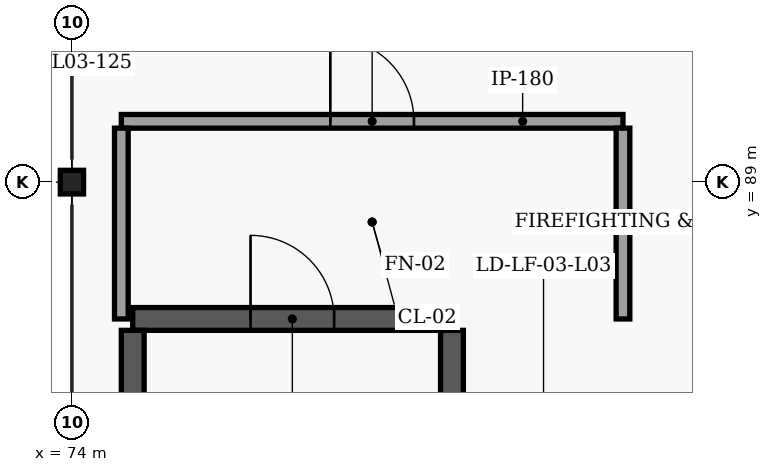
"""IFC4 building model, lengths in metres.
Left out: names, types, materials, properties, quantities, classifications, styles, units other than length and angle.
Written with IfcOpenShell. Run it as: python <this file> out.ifc"""

import sys

from ifc_helpers import new_model, si_unit, direction, frame, frame_2d, origin, origin_2d, place, context, subcontext, project, spatial, rectangle, i_section, extrude, element, fill, save


model = new_model("IFC4")
c1 = context("Model", 3, precision=1e-05, world=origin(), true_north=direction((0.0, 1.0)))
c2 = subcontext(c1, "Body", "Model", "MODEL_VIEW")
j1 = project(units=[si_unit("LENGTHUNIT", "METRE"), si_unit("PLANEANGLEUNIT", "RADIAN")], contexts=[c1])
p1 = place(None, origin())
s1 = spatial("IfcSite", under=j1, at=p1, CompositionType="ELEMENT")
p2 = place(p1, origin())
s2 = spatial("IfcBuilding", under=s1, at=p2, CompositionType="ELEMENT")
p3 = place(p2, frame((0.0, 0.0, 10.2)))
s3 = spatial("IfcBuildingStorey", under=s2, at=p3, CompositionType="ELEMENT", Elevation=10.2)
p4 = place(p3, frame((74.0, 89.0, 0.0), z_axis=(0.0, 0.0, 1.0), x_axis=(1.0, 0.0, 0.0)))
e1 = element("IfcColumn", 1, at=p4, inside=s3, PredefinedType="COLUMN", context=c2, shape_type="SweptSolid", body=[
    extrude(i_section(OverallWidth=0.306, OverallDepth=0.311, WebThickness=0.011, FlangeThickness=0.017, FilletRadius=0.015, at=origin_2d()), origin(), (0.0, 0.0, 1.0), 3.92),
])
p5 = place(p3, frame((74.8, 87.2, 0.0), z_axis=(0.0, 0.0, 1.0), x_axis=(1.0, 0.0, 0.0)))
e2 = element("IfcWall", 2, at=p5, inside=s3, PredefinedType="SHEAR", context=c2, shape_type="SweptSolid", body=[
    extrude(rectangle(XDim=4.2, YDim=0.3, at=frame_2d((2.1, 0.0))), origin(), (0.0, 0.0, 1.0), 3.92),
])
p6 = place(p5, frame((1.55, 0.0, 0.0)))
e3 = element("IfcOpeningElement", 3, at=p6, cuts=e2, PredefinedType="OPENING", context=c2, shape_type="SweptSolid", body=[
    extrude(rectangle(XDim=1.1, YDim=2.2, at=frame_2d((0.55, 1.1))), frame((0.0, 0.16, 0.0), z_axis=(0.0, -1.0, 0.0), x_axis=(1.0, 0.0, 0.0)), (0.0, 0.0, 1.0), 0.32),
])
for number, where, z_axis, x_axis in (
    (4, (74.8, 78.35, 0.0), (0.0, 0.0, 1.0), (0.0, 1.0, 0.0)),
    (5, (79.0, 78.35, 0.0), (0.0, 0.0, 1.0), (0.0, 1.0, 0.0)),
):
    element("IfcWall", number, at=place(p3, frame(where, z_axis=z_axis, x_axis=x_axis)), inside=s3, PredefinedType="SHEAR", context=c2, shape_type="SweptSolid", body=[
        extrude(rectangle(XDim=8.7, YDim=0.3, at=frame_2d((4.35, 0.0))), origin(), (0.0, 0.0, 1.0), 3.92),
    ])
p7 = place(p3, frame((74.65, 89.8, 0.0), z_axis=(0.0, 0.0, 1.0), x_axis=(1.0, 0.0, 0.0)))
e6 = element("IfcWall", 6, at=p7, inside=s3, PredefinedType="SOLIDWALL", context=c2, shape_type="SweptSolid", body=[
    extrude(rectangle(XDim=6.6, YDim=0.18, at=frame_2d((3.3, 0.0))), origin(), (0.0, 0.0, 1.0), 3.9),
])
p8 = place(p7, frame((2.75, 0.0, 0.0)))
e7 = element("IfcOpeningElement", 7, at=p8, cuts=e6, PredefinedType="OPENING", context=c2, shape_type="SweptSolid", body=[
    extrude(rectangle(XDim=1.1, YDim=2.2, at=frame_2d((0.55, 1.1))), frame((0.0, 0.1, 0.0), z_axis=(0.0, -1.0, 0.0), x_axis=(1.0, 0.0, 0.0)), (0.0, 0.0, 1.0), 0.2),
])
for number, where, z_axis, x_axis in (
    (8, (74.65, 87.2, 0.0), (0.0, 0.0, 1.0), (0.0, 1.0, 0.0)),
    (9, (81.25, 87.2, 0.0), (0.0, 0.0, 1.0), (0.0, 1.0, 0.0)),
):
    element("IfcWall", number, at=place(p3, frame(where, z_axis=z_axis, x_axis=x_axis)), inside=s3, PredefinedType="SOLIDWALL", context=c2, shape_type="SweptSolid", body=[
        extrude(rectangle(XDim=2.51, YDim=0.18, at=frame_2d((1.255, 0.0))), origin(), (0.0, 0.0, 1.0), 3.503),
    ])
p9 = place(p6, origin())
e10 = element("IfcDoor", 10, at=p9, inside=s3, OperationType="SINGLE_SWING_LEFT", PredefinedType="DOOR", context=c2, shape_type="SweptSolid", body=[
    extrude(rectangle(XDim=1.1, YDim=2.2, at=frame_2d((0.55, 1.1))), frame((0.0, 0.025, 0.0), z_axis=(0.0, -1.0, 0.0), x_axis=(1.0, 0.0, 0.0)), (0.0, 0.0, 1.0), 0.05),
])
fill(e3, e10)
p10 = place(p8, origin())
e11 = element("IfcDoor", 11, at=p10, inside=s3, OperationType="SINGLE_SWING_LEFT", PredefinedType="DOOR", context=c2, shape_type="SweptSolid", body=[
    extrude(rectangle(XDim=1.1, YDim=2.2, at=frame_2d((0.55, 1.1))), frame((0.0, 0.025, 0.0), z_axis=(0.0, -1.0, 0.0), x_axis=(1.0, 0.0, 0.0)), (0.0, 0.0, 1.0), 0.05),
])
fill(e7, e11)
save(model, sys.argv[1])
